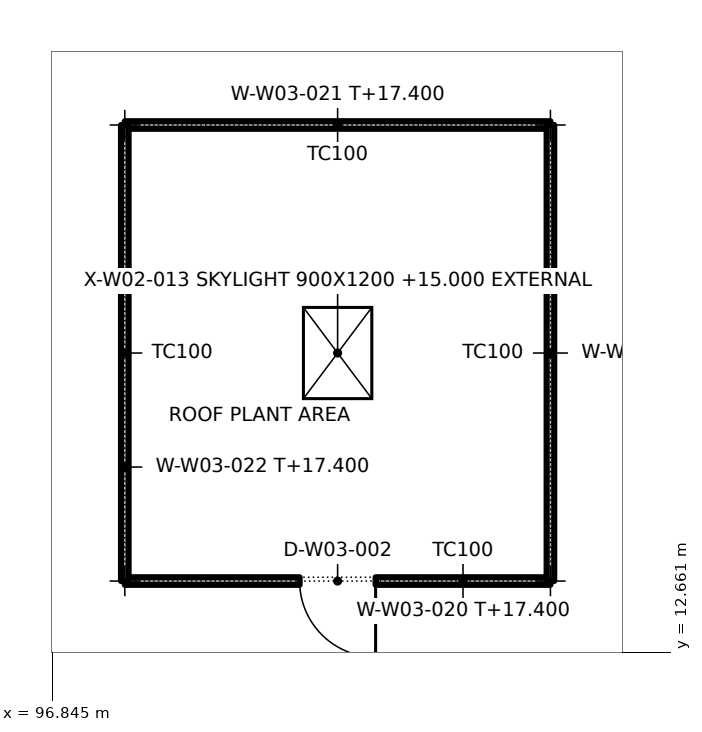
"""IFC4 building model, lengths in metres.
Left out: names, types, materials, properties, quantities, classifications, styles, units other than length and angle.
Written with IfcOpenShell. Run it as: python <this file> out.ifc"""

import sys

from ifc_helpers import new_model, si_unit, direction, frame, frame_2d, origin, origin_2d, place, context, subcontext, project, spatial, rectangle, extrude, element, fill, save


model = new_model("IFC4")
c1 = context("Model", 3, precision=1e-05, world=origin(), true_north=direction((0.0, 1.0)))
c2 = subcontext(c1, "Body", "Model", "MODEL_VIEW")
j1 = project(units=[si_unit("LENGTHUNIT", "METRE"), si_unit("PLANEANGLEUNIT", "RADIAN")], contexts=[c1])
p1 = place(None, origin())
s1 = spatial("IfcSite", under=j1, at=p1, CompositionType="ELEMENT")
p2 = place(p1, origin())
s2 = spatial("IfcBuilding", under=s1, at=p2, CompositionType="ELEMENT")
p3 = place(p2, frame((0.0, 0.0, 15.0)))
s3 = spatial("IfcBuildingStorey", under=s2, at=p3, CompositionType="ELEMENT", Elevation=15.0)
p4 = place(p3, frame((97.8, 13.6, 0.0), z_axis=(0.0, 0.0, 1.0), x_axis=(1.0, 0.0, 0.0)))
e1 = element("IfcWall", 1, at=p4, inside=s3, PredefinedType="SOLIDWALL", context=c2, shape_type="SweptSolid", body=[
    extrude(rectangle(XDim=5.6, YDim=0.1, at=frame_2d((2.8, 0.0))), origin(), (0.0, 0.0, 1.0), 2.4),
])
p5 = place(p4, frame((2.3, 0.0, 0.0)))
e2 = element("IfcOpeningElement", 2, at=p5, cuts=e1, PredefinedType="OPENING", context=c2, shape_type="SweptSolid", body=[
    extrude(rectangle(XDim=1.0, YDim=2.1, at=frame_2d((0.5, 1.05))), frame((0.0, 0.06, 0.0), z_axis=(0.0, -1.0, 0.0), x_axis=(1.0, 0.0, 0.0)), (0.0, 0.0, 1.0), 0.12),
])
p6 = place(p3, frame((97.8, 19.6, 0.0), z_axis=(0.0, 0.0, 1.0), x_axis=(1.0, 0.0, 0.0)))
e3 = element("IfcWall", 3, at=p6, inside=s3, PredefinedType="SOLIDWALL", context=c2, shape_type="SweptSolid", body=[
    extrude(rectangle(XDim=5.6, YDim=0.1, at=frame_2d((2.8, 0.0))), origin(), (0.0, 0.0, 1.0), 2.4),
])
for number, where, z_axis, x_axis in (
    (4, (97.8, 13.6, 0.0), (0.0, 0.0, 1.0), (0.0, 1.0, 0.0)),
    (5, (103.4, 13.6, 0.0), (0.0, 0.0, 1.0), (0.0, 1.0, 0.0)),
):
    element("IfcWall", number, at=place(p3, frame(where, z_axis=z_axis, x_axis=x_axis)), inside=s3, PredefinedType="SOLIDWALL", context=c2, shape_type="SweptSolid", body=[
        extrude(rectangle(XDim=6.0, YDim=0.1, at=frame_2d((3.0, 0.0))), origin(), (0.0, 0.0, 1.0), 2.4),
    ])
p7 = place(p3, frame((0.0, 0.0, -0.18)))
p8 = place(p7, frame((100.6, 16.6, 0.0)))
p9 = place(p8, frame((0.0, 0.0, 0.13)))
e6 = element("IfcWindow", 6, at=p9, inside=s3, PartitioningType="SINGLE_PANEL", PredefinedType="SKYLIGHT", context=c2, shape_type="SweptSolid", body=[
    extrude(rectangle(XDim=0.9, YDim=1.2, at=origin_2d()), origin(), (0.0, 0.0, 1.0), 0.05),
])
p10 = place(p5, frame((1.0, 0.0, 0.0), z_axis=(0.0, 0.0, 1.0), x_axis=(-1.0, 0.0, 0.0)))
e7 = element("IfcDoor", 7, at=p10, inside=s3, OperationType="SINGLE_SWING_LEFT", PredefinedType="DOOR", context=c2, shape_type="SweptSolid", body=[
    extrude(rectangle(XDim=1.0, YDim=2.1, at=frame_2d((0.5, 1.05))), frame((0.0, 0.025, 0.0), z_axis=(0.0, -1.0, 0.0), x_axis=(1.0, 0.0, 0.0)), (0.0, 0.0, 1.0), 0.05),
])
fill(e2, e7)
save(model, sys.argv[1])
